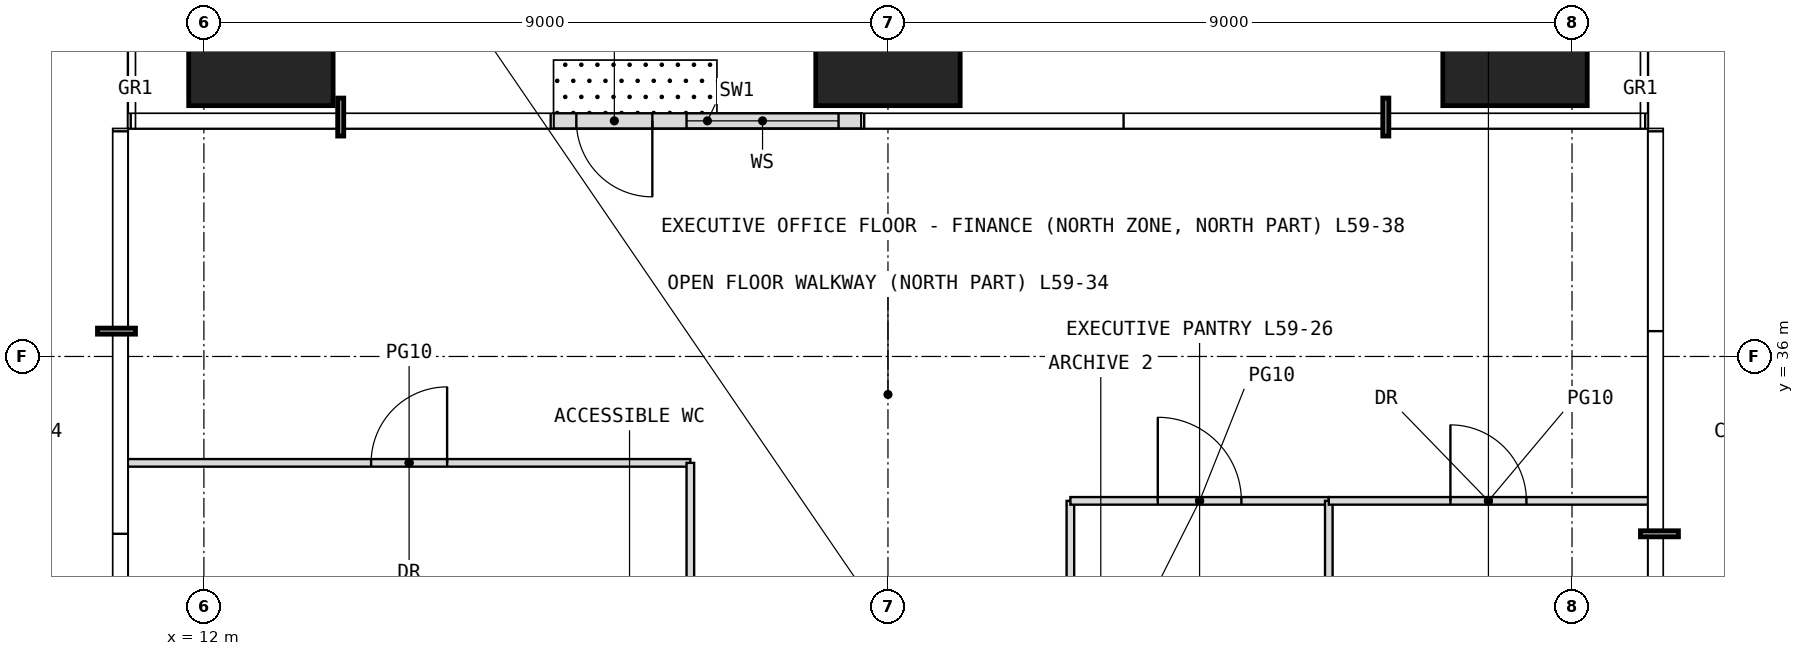
"""IFC4 building model, lengths in metres.
Left out: names, types, materials, properties, quantities, classifications, styles, units other than length and angle.
Written with IfcOpenShell. Run it as: python <this file> out.ifc"""

import sys

from ifc_helpers import new_model, si_unit, direction, frame, frame_2d, origin, origin_2d, place, context, subcontext, project, spatial, rectangle, extrude, element, fill, save


model = new_model("IFC4")
c1 = context("Model", 3, precision=1e-05, world=origin(), true_north=direction((0.0, 1.0)))
c2 = subcontext(c1, "Body", "Model", "MODEL_VIEW")
j1 = project(units=[si_unit("LENGTHUNIT", "METRE"), si_unit("PLANEANGLEUNIT", "RADIAN")], contexts=[c1])
p1 = place(None, origin())
s1 = spatial("IfcSite", under=j1, at=p1, CompositionType="ELEMENT")
p2 = place(p1, origin())
s2 = spatial("IfcBuilding", under=s1, at=p2, CompositionType="ELEMENT")
p3 = place(p2, frame((0.0, 0.0, 248.2)))
s3 = spatial("IfcBuildingStorey", under=s2, at=p3, CompositionType="ELEMENT", Elevation=248.2)
for number, where, z_axis, x_axis in (
    (1, (12.75, 40.25, 0.0), (0.0, 0.0, 1.0), (1.0, 0.0, 0.0)),
    (2, (21.0, 40.25, 0.0), (0.0, 0.0, 1.0), (1.0, 0.0, 0.0)),
    (3, (29.25, 40.25, 0.0), (0.0, 0.0, 1.0), (1.0, 0.0, 0.0)),
):
    element("IfcColumn", number, at=place(p3, frame(where, z_axis=z_axis, x_axis=x_axis)), inside=s3, PredefinedType="COLUMN", context=c2, shape_type="SweptSolid", body=[
        extrude(rectangle(XDim=1.9, YDim=1.9, at=origin_2d()), origin(), (0.0, 0.0, 1.0), 4.2),
    ])
p4 = place(p3, frame((20.65, 39.1, 0.0), z_axis=(0.0, 0.0, 1.0), x_axis=(-1.0, 0.0, 0.0)))
e4 = element("IfcWall", 4, at=p4, inside=s3, PredefinedType="USERDEFINED", context=c2, shape_type="SweptSolid", body=[
    extrude(rectangle(XDim=4.05, YDim=0.2, at=frame_2d((2.025, 0.0))), origin(), (0.0, 0.0, 1.0), 3.95),
])
p5 = place(p4, frame((2.75, 0.0, 0.0)))
e5 = element("IfcOpeningElement", 5, at=p5, cuts=e4, PredefinedType="OPENING", context=c2, shape_type="SweptSolid", body=[
    extrude(rectangle(XDim=1.0, YDim=2.4, at=frame_2d((0.5, 1.2))), frame((0.0, 0.11, 0.0), z_axis=(0.0, -1.0, 0.0), x_axis=(1.0, 0.0, 0.0)), (0.0, 0.0, 1.0), 0.22),
])
p6 = place(p4, frame((0.3, 0.0, 0.3)))
e6 = element("IfcOpeningElement", 6, at=p6, cuts=e4, PredefinedType="OPENING", context=c2, shape_type="SweptSolid", body=[
    extrude(rectangle(XDim=2.0, YDim=2.7, at=frame_2d((1.0, 1.35))), frame((0.0, 0.11, 0.0), z_axis=(0.0, -1.0, 0.0), x_axis=(1.0, 0.0, 0.0)), (0.0, 0.0, 1.0), 0.22),
])
p7 = place(p3, frame((11.0, 34.6, 0.0), z_axis=(0.0, 0.0, 1.0), x_axis=(1.0, 0.0, 0.0)))
e7 = element("IfcWall", 7, at=p7, inside=s3, PredefinedType="PARTITIONING", context=c2, shape_type="SweptSolid", body=[
    extrude(rectangle(XDim=7.4, YDim=0.1, at=frame_2d((3.7, 0.0))), origin(), (0.0, 0.0, 1.0), 3.95),
])
p8 = place(p7, frame((3.2, 0.0, 0.0)))
e8 = element("IfcOpeningElement", 8, at=p8, cuts=e7, PredefinedType="OPENING", context=c2, shape_type="SweptSolid", body=[
    extrude(rectangle(XDim=1.0, YDim=2.2, at=frame_2d((0.5, 1.1))), frame((0.0, 0.06, 0.0), z_axis=(0.0, -1.0, 0.0), x_axis=(1.0, 0.0, 0.0)), (0.0, 0.0, 1.0), 0.12),
])
p9 = place(p3, frame((18.4, 30.65, 0.0), z_axis=(0.0, 0.0, 1.0), x_axis=(0.0, 1.0, 0.0)))
e9 = element("IfcWall", 9, at=p9, inside=s3, PredefinedType="PARTITIONING", context=c2, shape_type="SweptSolid", body=[
    extrude(rectangle(XDim=3.95, YDim=0.1, at=frame_2d((1.975, 0.0))), origin(), (0.0, 0.0, 1.0), 3.95),
])
p10 = place(p3, frame((23.4, 30.65, 0.0), z_axis=(0.0, 0.0, 1.0), x_axis=(0.0, 1.0, 0.0)))
e10 = element("IfcWall", 10, at=p10, inside=s3, PredefinedType="PARTITIONING", context=c2, shape_type="SweptSolid", body=[
    extrude(rectangle(XDim=3.45, YDim=0.1, at=frame_2d((1.725, 0.0))), origin(), (0.0, 0.0, 1.0), 3.95),
])
p11 = place(p3, frame((23.4, 34.1, 0.0), z_axis=(0.0, 0.0, 1.0), x_axis=(1.0, 0.0, 0.0)))
e11 = element("IfcWall", 11, at=p11, inside=s3, PredefinedType="PARTITIONING", context=c2, shape_type="SweptSolid", body=[
    extrude(rectangle(XDim=3.4, YDim=0.1, at=frame_2d((1.7, 0.0))), origin(), (0.0, 0.0, 1.0), 3.95),
])
p12 = place(p11, frame((1.15, 0.0, 0.0)))
e12 = element("IfcOpeningElement", 12, at=p12, cuts=e11, PredefinedType="OPENING", context=c2, shape_type="SweptSolid", body=[
    extrude(rectangle(XDim=1.1, YDim=2.3, at=frame_2d((0.55, 1.15))), frame((0.0, 0.06, 0.0), z_axis=(0.0, -1.0, 0.0), x_axis=(1.0, 0.0, 0.0)), (0.0, 0.0, 1.0), 0.12),
])
p13 = place(p3, frame((26.8, 30.65, 0.0), z_axis=(0.0, 0.0, 1.0), x_axis=(0.0, 1.0, 0.0)))
e13 = element("IfcWall", 13, at=p13, inside=s3, PredefinedType="PARTITIONING", context=c2, shape_type="SweptSolid", body=[
    extrude(rectangle(XDim=3.45, YDim=0.1, at=frame_2d((1.725, 0.0))), origin(), (0.0, 0.0, 1.0), 3.95),
])
p14 = place(p3, frame((26.8, 34.1, 0.0), z_axis=(0.0, 0.0, 1.0), x_axis=(1.0, 0.0, 0.0)))
e14 = element("IfcWall", 14, at=p14, inside=s3, PredefinedType="PARTITIONING", context=c2, shape_type="SweptSolid", body=[
    extrude(rectangle(XDim=4.2, YDim=0.1, at=frame_2d((2.1, 0.0))), origin(), (0.0, 0.0, 1.0), 3.95),
])
p15 = place(p14, frame((1.6, 0.0, 0.0)))
e15 = element("IfcOpeningElement", 15, at=p15, cuts=e14, PredefinedType="OPENING", context=c2, shape_type="SweptSolid", body=[
    extrude(rectangle(XDim=1.0, YDim=2.2, at=frame_2d((0.5, 1.1))), frame((0.0, 0.06, 0.0), z_axis=(0.0, -1.0, 0.0), x_axis=(1.0, 0.0, 0.0)), (0.0, 0.0, 1.0), 0.12),
])
p16 = place(p5, origin())
e16 = element("IfcDoor", 16, at=p16, inside=s3, OperationType="SINGLE_SWING_LEFT", PredefinedType="DOOR", context=c2, shape_type="SweptSolid", body=[
    extrude(rectangle(XDim=1.0, YDim=2.4, at=frame_2d((0.5, 1.2))), frame((0.0, 0.025, 0.0), z_axis=(0.0, -1.0, 0.0), x_axis=(1.0, 0.0, 0.0)), (0.0, 0.0, 1.0), 0.05),
])
fill(e5, e16)
p17 = place(p6, origin())
e17 = element("IfcWindow", 17, at=p17, inside=s3, PartitioningType="SINGLE_PANEL", PredefinedType="WINDOW", context=c2, shape_type="SweptSolid", body=[
    extrude(rectangle(XDim=2.0, YDim=2.7, at=frame_2d((1.0, 1.35))), frame((0.0, 0.03, 0.0), z_axis=(0.0, -1.0, 0.0), x_axis=(1.0, 0.0, 0.0)), (0.0, 0.0, 1.0), 0.06),
])
fill(e6, e17)
p18 = place(p8, origin())
e18 = element("IfcDoor", 18, at=p18, inside=s3, OperationType="SINGLE_SWING_RIGHT", PredefinedType="DOOR", context=c2, shape_type="SweptSolid", body=[
    extrude(rectangle(XDim=1.0, YDim=2.2, at=frame_2d((0.5, 1.1))), frame((0.0, 0.025, 0.0), z_axis=(0.0, -1.0, 0.0), x_axis=(1.0, 0.0, 0.0)), (0.0, 0.0, 1.0), 0.05),
])
fill(e8, e18)
p19 = place(p12, origin())
e19 = element("IfcDoor", 19, at=p19, inside=s3, OperationType="SINGLE_SWING_LEFT", PredefinedType="DOOR", context=c2, shape_type="SweptSolid", body=[
    extrude(rectangle(XDim=1.1, YDim=2.3, at=frame_2d((0.55, 1.15))), frame((0.0, 0.025, 0.0), z_axis=(0.0, -1.0, 0.0), x_axis=(1.0, 0.0, 0.0)), (0.0, 0.0, 1.0), 0.05),
])
fill(e12, e19)
p20 = place(p15, origin())
e20 = element("IfcDoor", 20, at=p20, inside=s3, OperationType="SINGLE_SWING_LEFT", PredefinedType="DOOR", context=c2, shape_type="SweptSolid", body=[
    extrude(rectangle(XDim=1.0, YDim=2.2, at=frame_2d((0.5, 1.1))), frame((0.0, 0.025, 0.0), z_axis=(0.0, -1.0, 0.0), x_axis=(1.0, 0.0, 0.0)), (0.0, 0.0, 1.0), 0.05),
])
fill(e15, e20)
save(model, sys.argv[1])
